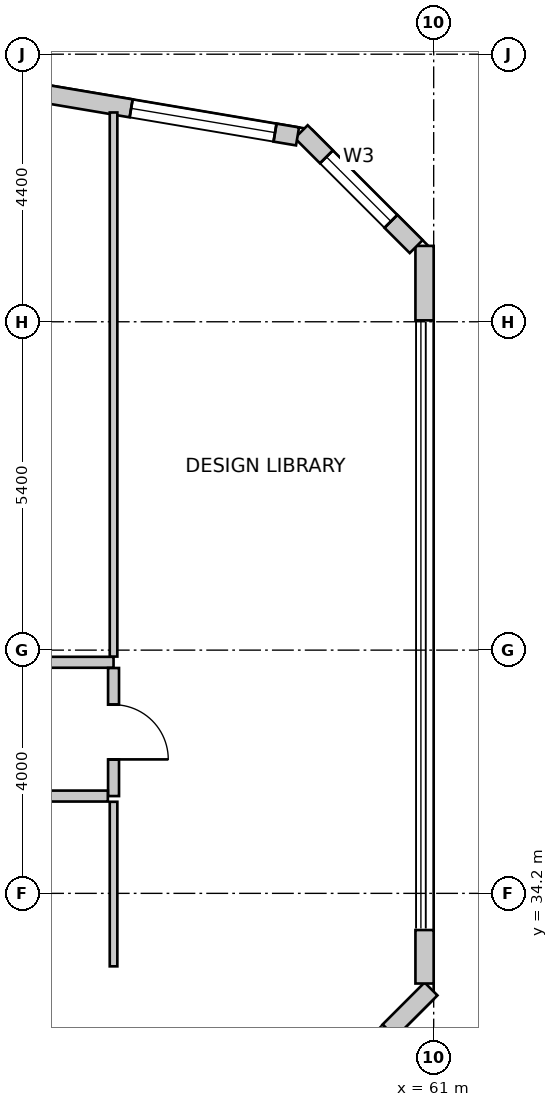
"""IFC4 building model, lengths in metres.
Left out: names, types, materials, properties, quantities, classifications, styles, units other than length and angle.
Written with IfcOpenShell. Run it as: python <this file> out.ifc"""

import sys

from ifc_helpers import new_model, si_unit, direction, frame, frame_2d, origin, place, context, subcontext, project, spatial, rectangle, extrude, source, transform, mapped, element, fill, save


model = new_model("IFC4")
c1 = context("Model", 3, precision=1e-05, world=origin(), true_north=direction((0.0, 1.0)))
c2 = subcontext(c1, "Body", "Model", "MODEL_VIEW")
j1 = project(units=[si_unit("LENGTHUNIT", "METRE"), si_unit("PLANEANGLEUNIT", "RADIAN")], contexts=[c1])
p1 = place(None, origin())
s1 = spatial("IfcSite", under=j1, at=p1, CompositionType="ELEMENT")
p2 = place(p1, origin())
s2 = spatial("IfcBuilding", under=s1, at=p2, CompositionType="ELEMENT")
p3 = place(p2, frame((0.0, 0.0, 51.0)))
s3 = spatial("IfcBuildingStorey", under=s2, at=p3, CompositionType="ELEMENT", Elevation=51.0)
p4 = place(p3, frame((57.876, 29.548, 0.0), z_axis=(0.0, 0.0, 1.0), x_axis=(0.707106781187, 0.707106781187, 0.0)))
e1 = element("IfcWall", 1, at=p4, inside=s3, PredefinedType="SOLIDWALL", context=c2, shape_type="SweptSolid", body=[
    extrude(rectangle(XDim=4.356, YDim=0.3, at=frame_2d((2.178, 0.0))), origin(), (0.0, 0.0, 1.0), 3.75),
])
m1 = source(origin(), c2, "Body", "SweptSolid", [
    extrude(rectangle(XDim=2.4, YDim=2.2, at=frame_2d((1.2, 1.1))), frame((0.0, 0.16, 0.0), z_axis=(0.0, -1.0, 0.0), x_axis=(1.0, 0.0, 0.0)), (0.0, 0.0, 1.0), 0.32),
])
p5 = place(p4, frame((0.978, 0.0, 0.85)))
e2 = element("IfcOpeningElement", 2, at=p5, cuts=e1, PredefinedType="OPENING", context=c2, shape_type="MappedRepresentation", body=[
    mapped(m1, transform((0.0, 0.0, 0.0), scale=1.0)),
])
p6 = place(p3, frame((60.85, 32.717, 0.0), z_axis=(0.0, 0.0, 1.0), x_axis=(0.0, 1.0, 0.0)))
e3 = element("IfcWall", 3, at=p6, inside=s3, PredefinedType="SOLIDWALL", context=c2, shape_type="SweptSolid", body=[
    extrude(rectangle(XDim=0.88, YDim=0.3, at=frame_2d((0.44, 0.0))), origin(), (0.0, 0.0, 1.0), 3.75),
])
p7 = place(p3, frame((60.85, 43.623, 0.0), z_axis=(0.0, 0.0, 1.0), x_axis=(0.0, 1.0, 0.0)))
e4 = element("IfcWall", 4, at=p7, inside=s3, PredefinedType="SOLIDWALL", context=c2, shape_type="SweptSolid", body=[
    extrude(rectangle(XDim=1.225, YDim=0.3, at=frame_2d((0.613, 0.0))), origin(), (0.0, 0.0, 1.0), 3.75),
])
p8 = place(p3, frame((60.712, 44.836, 0.0), z_axis=(0.0, 0.0, 1.0), x_axis=(-0.707106781187, 0.707106781187, 0.0)))
e5 = element("IfcWall", 5, at=p8, inside=s3, PredefinedType="SOLIDWALL", context=c2, shape_type="SweptSolid", body=[
    extrude(rectangle(XDim=2.673, YDim=0.3, at=frame_2d((1.336, 0.0))), origin(), (0.0, 0.0, 1.0), 3.75),
])
m2 = source(origin(), c2, "Body", "SweptSolid", [
    extrude(rectangle(XDim=1.5, YDim=1.8, at=frame_2d((0.75, 0.9))), frame((0.0, 0.16, 0.0), z_axis=(0.0, -1.0, 0.0), x_axis=(1.0, 0.0, 0.0)), (0.0, 0.0, 1.0), 0.32),
])
p9 = place(p8, frame((0.587, 0.0, 0.85)))
e6 = element("IfcOpeningElement", 6, at=p9, cuts=e5, PredefinedType="OPENING", context=c2, shape_type="MappedRepresentation", body=[
    mapped(m2, transform((0.0, 0.0, 0.0), scale=1.0)),
])
p10 = place(p3, frame((58.761, 46.648, 0.0), z_axis=(0.0, 0.0, 1.0), x_axis=(-0.98607502735, 0.166301053624, 0.0)))
e7 = element("IfcWall", 7, at=p10, inside=s3, PredefinedType="SOLIDWALL", context=c2, shape_type="SweptSolid", body=[
    extrude(rectangle(XDim=37.397, YDim=0.3, at=frame_2d((18.699, 0.0))), origin(), (0.0, 0.0, 1.0), 3.75),
])
p11 = place(p10, frame((0.375, 0.0, 0.85)))
e8 = element("IfcOpeningElement", 8, at=p11, cuts=e7, PredefinedType="OPENING", context=c2, shape_type="MappedRepresentation", body=[
    mapped(m1, transform((0.0, 0.0, 0.0), scale=1.0)),
])
m3 = source(origin(), c2, "Body", "SweptSolid", [
    extrude(rectangle(XDim=2.8, YDim=2.4, at=frame_2d((1.4, 1.2))), frame((0.0, 0.16, 0.0), z_axis=(0.0, -1.0, 0.0), x_axis=(1.0, 0.0, 0.0)), (0.0, 0.0, 1.0), 0.32),
])
p12 = place(p10, frame((5.357, 0.0, 0.85)))
e9 = element("IfcOpeningElement", 9, at=p12, cuts=e7, PredefinedType="OPENING", context=c2, shape_type="MappedRepresentation", body=[
    mapped(m3, transform((0.0, 0.0, 0.0), scale=1.0)),
])
p13 = place(p10, frame((12.772, 0.0, 0.85)))
e10 = element("IfcOpeningElement", 10, at=p13, cuts=e7, PredefinedType="OPENING", context=c2, shape_type="MappedRepresentation", body=[
    mapped(m3, transform((0.0, 0.0, 0.0), scale=1.0)),
])
p14 = place(p10, frame((19.194, 0.0, 0.85)))
e11 = element("IfcOpeningElement", 11, at=p14, cuts=e7, PredefinedType="OPENING", context=c2, shape_type="MappedRepresentation", body=[
    mapped(m3, transform((0.0, 0.0, 0.0), scale=1.0)),
])
p15 = place(p10, frame((24.384, 0.0, 0.85)))
e12 = element("IfcOpeningElement", 12, at=p15, cuts=e7, PredefinedType="OPENING", context=c2, shape_type="MappedRepresentation", body=[
    mapped(m1, transform((0.0, 0.0, 0.0), scale=1.0)),
])
p16 = place(p10, frame((29.757, 0.0, 0.85)))
e13 = element("IfcOpeningElement", 13, at=p16, cuts=e7, PredefinedType="OPENING", context=c2, shape_type="MappedRepresentation", body=[
    mapped(m3, transform((0.0, 0.0, 0.0), scale=1.0)),
])
p17 = place(p10, frame((34.256, 0.0, 0.85)))
e14 = element("IfcOpeningElement", 14, at=p17, cuts=e7, PredefinedType="OPENING", context=c2, shape_type="MappedRepresentation", body=[
    mapped(m3, transform((0.0, 0.0, 0.0), scale=1.0)),
])
p18 = place(p3, frame((48.585, 38.0, 0.0), z_axis=(0.0, 0.0, 1.0), x_axis=(1.0, 0.0, 0.0)))
e15 = element("IfcWall", 15, at=p18, inside=s3, PredefinedType="PARTITIONING", context=c2, shape_type="SweptSolid", body=[
    extrude(rectangle(XDim=7.15, YDim=0.18, at=frame_2d((3.575, 0.0))), origin(), (0.0, 0.0, 1.0), 3.75),
])
m4 = source(origin(), c2, "Body", "SweptSolid", [
    extrude(rectangle(XDim=0.9, YDim=2.15, at=frame_2d((0.45, 1.075))), frame((0.0, 0.1, 0.0), z_axis=(0.0, -1.0, 0.0), x_axis=(1.0, 0.0, 0.0)), (0.0, 0.0, 1.0), 0.2),
])
p19 = place(p18, frame((3.064, 0.0, 0.0)))
e16 = element("IfcOpeningElement", 16, at=p19, cuts=e15, PredefinedType="OPENING", context=c2, shape_type="MappedRepresentation", body=[
    mapped(m4, transform((0.0, 0.0, 0.0), scale=1.0)),
])
p20 = place(p3, frame((55.735, 37.906, 0.0), z_axis=(0.0, 0.0, 1.0), x_axis=(0.0, -1.0, 0.0)))
e17 = element("IfcWall", 17, at=p20, inside=s3, PredefinedType="PARTITIONING", context=c2, shape_type="SweptSolid", body=[
    extrude(rectangle(XDim=2.106, YDim=0.18, at=frame_2d((1.053, 0.0))), origin(), (0.0, 0.0, 1.0), 3.75),
])
p21 = place(p20, frame((0.603, 0.0, 0.0)))
e18 = element("IfcOpeningElement", 18, at=p21, cuts=e17, PredefinedType="OPENING", context=c2, shape_type="MappedRepresentation", body=[
    mapped(m4, transform((0.0, 0.0, 0.0), scale=1.0)),
])
p22 = place(p3, frame((55.641, 35.8, 0.0), z_axis=(0.0, 0.0, 1.0), x_axis=(-1.0, 0.0, 0.0)))
e19 = element("IfcWall", 19, at=p22, inside=s3, PredefinedType="PARTITIONING", context=c2, shape_type="SweptSolid", body=[
    extrude(rectangle(XDim=21.841, YDim=0.18, at=frame_2d((10.92, 0.0))), origin(), (0.0, 0.0, 1.0), 3.125),
])
p23 = place(p22, frame((10.531, 0.0, 0.0)))
e20 = element("IfcOpeningElement", 20, at=p23, cuts=e19, PredefinedType="OPENING", context=c2, shape_type="MappedRepresentation", body=[
    mapped(m4, transform((0.0, 0.0, 0.0), scale=1.0)),
])
p24 = place(p3, frame((55.735, 47.042, 0.0), z_axis=(0.0, 0.0, 1.0), x_axis=(0.0, -1.0, 0.0)))
e21 = element("IfcWall", 21, at=p24, inside=s3, PredefinedType="PARTITIONING", context=c2, shape_type="SweptSolid", body=[
    extrude(rectangle(XDim=8.948, YDim=0.125, at=frame_2d((4.474, 0.0))), origin(), (0.0, 0.0, 1.0), 3.75),
])
p25 = place(p3, frame((55.735, 33.0, 0.0), z_axis=(0.0, 0.0, 1.0), x_axis=(0.0, 1.0, 0.0)))
e22 = element("IfcWall", 22, at=p25, inside=s3, PredefinedType="PARTITIONING", context=c2, shape_type="SweptSolid", body=[
    extrude(rectangle(XDim=2.706, YDim=0.125, at=frame_2d((1.353, 0.0))), origin(), (0.0, 0.0, 1.0), 3.75),
])
m5 = source(origin(), c2, "Body", "SweptSolid", [
    extrude(rectangle(XDim=1.5, YDim=1.8, at=frame_2d((0.75, 0.9))), frame((0.0, -0.015, 0.0), z_axis=(0.0, -1.0, 0.0), x_axis=(1.0, 0.0, 0.0)), (0.0, 0.0, 1.0), 0.06),
])
p26 = place(p9, origin())
e23 = element("IfcWindow", 23, at=p26, inside=s3, PartitioningType="SINGLE_PANEL", PredefinedType="WINDOW", context=c2, shape_type="MappedRepresentation", body=[
    mapped(m5, transform((0.0, 0.0, 0.0), scale=1.0)),
])
fill(e6, e23)
m6 = source(origin(), c2, "Body", "SweptSolid", [
    extrude(rectangle(XDim=2.4, YDim=2.2, at=frame_2d((1.2, 1.1))), frame((0.0, -0.015, 0.0), z_axis=(0.0, -1.0, 0.0), x_axis=(1.0, 0.0, 0.0)), (0.0, 0.0, 1.0), 0.06),
])
p27 = place(p11, origin())
e24 = element("IfcWindow", 24, at=p27, inside=s3, PartitioningType="SINGLE_PANEL", PredefinedType="WINDOW", context=c2, shape_type="MappedRepresentation", body=[
    mapped(m6, transform((0.0, 0.0, 0.0), scale=1.0)),
])
fill(e8, e24)
m7 = source(origin(), c2, "Body", "SweptSolid", [
    extrude(rectangle(XDim=0.9, YDim=2.15, at=frame_2d((0.45, 1.075))), frame((0.0, 0.025, 0.0), z_axis=(0.0, -1.0, 0.0), x_axis=(1.0, 0.0, 0.0)), (0.0, 0.0, 1.0), 0.05),
])
p28 = place(p21, origin())
e25 = element("IfcDoor", 25, at=p28, inside=s3, OperationType="SINGLE_SWING_RIGHT", PredefinedType="DOOR", context=c2, shape_type="MappedRepresentation", body=[
    mapped(m7, transform((0.0, 0.0, 0.0), scale=1.0)),
])
fill(e18, e25)
save(model, sys.argv[1])
